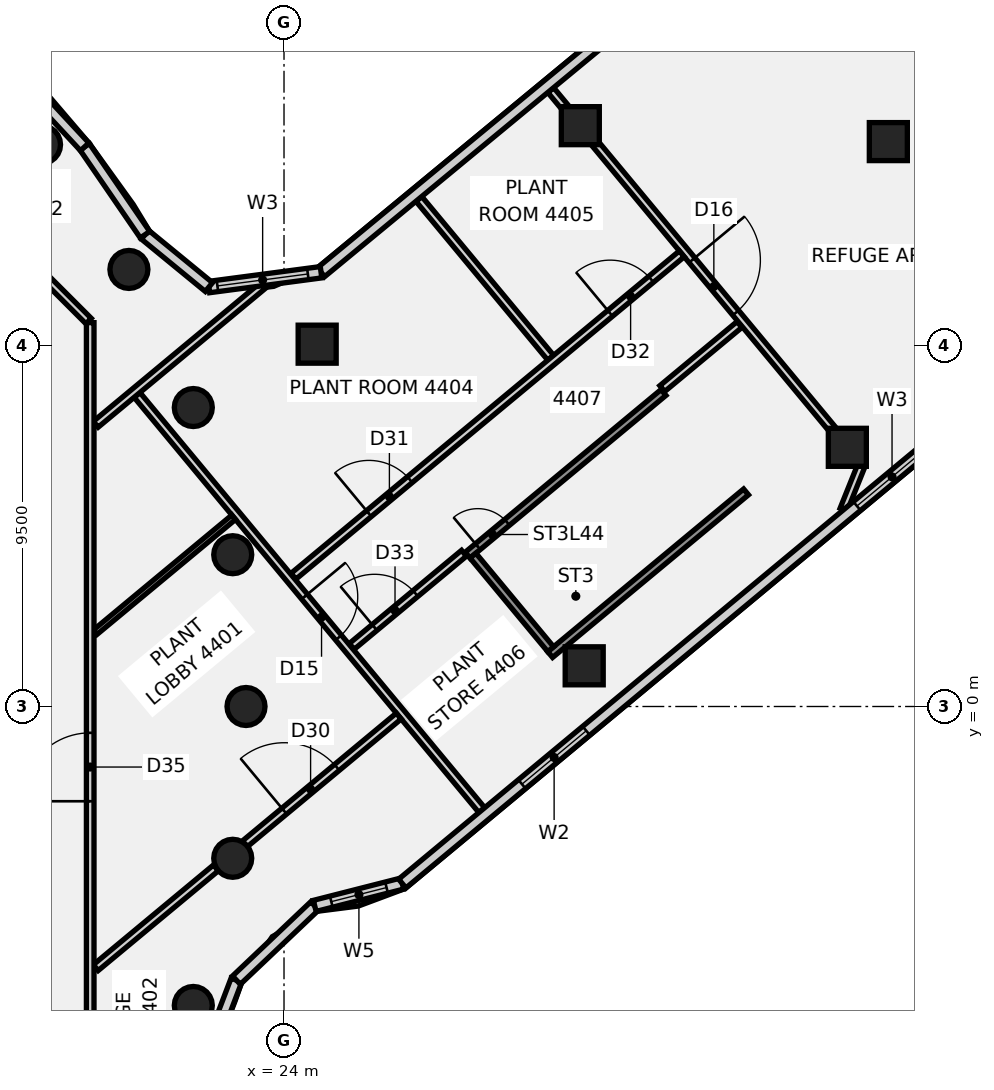
"""IFC4 building model, lengths in metres.
Left out: names, types, materials, properties, quantities, classifications, styles, units other than length and angle.
Written with IfcOpenShell. Run it as: python <this file> out.ifc"""

import sys

from ifc_helpers import new_model, si_unit, direction, frame, frame_2d, origin, origin_2d, place, context, subcontext, project, spatial, polyline, rectangle, circle, outline, extrude, element, fill, save


model = new_model("IFC4")
c1 = context("Model", 3, precision=1e-05, world=origin(), true_north=direction((0.0, 1.0)))
c2 = subcontext(c1, "Body", "Model", "MODEL_VIEW")
j1 = project(units=[si_unit("LENGTHUNIT", "METRE"), si_unit("PLANEANGLEUNIT", "RADIAN")], contexts=[c1])
p1 = place(None, origin())
s1 = spatial("IfcSite", under=j1, at=p1, CompositionType="ELEMENT")
p2 = place(p1, origin())
s2 = spatial("IfcBuilding", under=s1, at=p2, CompositionType="ELEMENT")
p3 = place(p2, frame((0.0, 0.0, 178.0)))
s3 = spatial("IfcBuildingStorey", under=s2, at=p3, CompositionType="ELEMENT", Elevation=178.0)
for number, where, z_axis, x_axis in (
    (1, (23.0, 0.0, -0.18), (0.0, 0.0, 1.0), (1.0, 0.0, 0.0)),
    (2, (22.651, 3.994, -0.18), (0.0, 0.0, 1.0), (1.0, 0.0, 0.0)),
    (3, (21.613, 7.866, -0.18), (0.0, 0.0, 1.0), (1.0, 0.0, 0.0)),
    (4, (19.919, 11.5, -0.18), (0.0, 0.0, 1.0), (1.0, 0.0, 0.0)),
    (5, (17.619, 14.784, -0.18), (0.0, 0.0, 1.0), (1.0, 0.0, 0.0)),
    (6, (21.613, -7.866, -0.18), (0.0, 0.0, 1.0), (1.0, 0.0, 0.0)),
    (7, (22.651, -3.994, -0.18), (0.0, 0.0, 1.0), (1.0, 0.0, 0.0)),
):
    element("IfcColumn", number, at=place(p3, frame(where, z_axis=z_axis, x_axis=x_axis)), inside=s3, PredefinedType="COLUMN", context=c2, shape_type="SweptSolid", body=[
        extrude(circle(Radius=0.5, at=origin_2d()), origin(), (0.0, 0.0, 1.0), 4.54),
    ])
for number, where, z_axis, x_axis in (
    (8, (31.797, 15.283, -0.151), (0.0, 0.0, 1.0), (0.769, 0.639, 0.0)),
    (9, (38.823, 6.82, -0.151), (0.0, 0.0, 1.0), (0.769, 0.639, 0.0)),
):
    element("IfcColumn", number, at=place(p3, frame(where, z_axis=z_axis, x_axis=x_axis)), inside=s3, PredefinedType="COLUMN", context=c2, shape_type="SweptSolid", body=[
        extrude(rectangle(XDim=1.0, YDim=1.0, at=origin_2d()), origin(), (0.0, 0.0, 1.0), 4.401),
    ])
for number, where, z_axis, x_axis in (
    (10, (24.872, 9.534, -0.162), (0.0, 0.0, 1.0), (0.769, 0.639, 0.0)),
    (11, (31.899, 1.071, -0.162), (0.0, 0.0, 1.0), (0.769, 0.639, 0.0)),
):
    element("IfcColumn", number, at=place(p3, frame(where, z_axis=z_axis, x_axis=x_axis)), inside=s3, PredefinedType="COLUMN", context=c2, shape_type="SweptSolid", body=[
        extrude(rectangle(XDim=1.0, YDim=1.0, at=origin_2d()), origin(), (0.0, 0.0, 1.0), 4.412),
    ])
p4 = place(p3, frame((39.902, 14.864, -0.132), z_axis=(0.0, 0.0, 1.0), x_axis=(0.769372797728, 0.638800045488, 0.0)))
e12 = element("IfcColumn", 12, at=p4, inside=s3, PredefinedType="COLUMN", context=c2, shape_type="SweptSolid", body=[
    extrude(rectangle(XDim=1.0, YDim=1.0, at=origin_2d()), origin(), (0.0, 0.0, 1.0), 4.382),
])
p5 = place(p3, frame((20.132, 8.198, 0.0), z_axis=(0.0, 0.0, 1.0), x_axis=(0.63886599142, -0.76931803892, 0.0)))
e13 = element("IfcWall", 13, at=p5, inside=s3, PredefinedType="PARTITIONING", context=c2, shape_type="SweptSolid", body=[
    extrude(rectangle(XDim=14.199, YDim=0.2, at=frame_2d((7.1, 0.0))), origin(), (0.0, 0.0, 1.0), 3.55),
])
p6 = place(p5, frame((6.9, 0.0, 0.0)))
e14 = element("IfcOpeningElement", 14, at=p6, cuts=e13, PredefinedType="OPENING", context=c2, shape_type="SweptSolid", body=[
    extrude(rectangle(XDim=1.4, YDim=2.1, at=frame_2d((0.7, 1.05))), frame((0.0, 0.11, 0.0), z_axis=(0.0, -1.0, 0.0), x_axis=(1.0, 0.0, 0.0)), (0.0, 0.0, 1.0), 0.22),
])
p7 = place(p3, frame((27.549, 13.355, 0.0), z_axis=(0.0, 0.0, 1.0), x_axis=(0.638732777431, -0.769428644538, 0.0)))
e15 = element("IfcWall", 15, at=p7, inside=s3, PredefinedType="PARTITIONING", context=c2, shape_type="SweptSolid", body=[
    extrude(rectangle(XDim=5.43, YDim=0.2, at=frame_2d((2.715, 0.0))), origin(), (0.0, 0.0, 1.0), 3.65),
])
p8 = place(p3, frame((31.019, 16.219, 0.0), z_axis=(0.0, 0.0, 1.0), x_axis=(0.638955780134, -0.769243466682, 0.0)))
e16 = element("IfcWall", 16, at=p8, inside=s3, PredefinedType="PARTITIONING", context=c2, shape_type="SweptSolid", body=[
    extrude(rectangle(XDim=0.626, YDim=0.2, at=frame_2d((0.313, 0.0))), origin(), (0.0, 0.0, 1.0), 3.66),
])
p9 = place(p3, frame((32.175, 14.827, 0.0), z_axis=(0.0, 0.0, 1.0), x_axis=(0.638855099659, -0.769327083651, 0.0)))
e17 = element("IfcWall", 17, at=p9, inside=s3, PredefinedType="PARTITIONING", context=c2, shape_type="SweptSolid", body=[
    extrude(rectangle(XDim=9.816, YDim=0.2, at=frame_2d((4.908, 0.0))), origin(), (0.0, 0.0, 1.0), 3.55),
])
p10 = place(p9, frame((4.009, 0.0, 0.0)))
e18 = element("IfcOpeningElement", 18, at=p10, cuts=e17, PredefinedType="OPENING", context=c2, shape_type="SweptSolid", body=[
    extrude(rectangle(XDim=1.8, YDim=2.1, at=frame_2d((0.9, 1.05))), frame((0.0, 0.11, 0.0), z_axis=(0.0, -1.0, 0.0), x_axis=(1.0, 0.0, 0.0)), (0.0, 0.0, 1.0), 0.22),
])
p11 = place(p3, frame((39.202, 6.365, 0.0), z_axis=(0.0, 0.0, 1.0), x_axis=(-0.372742207649, -0.92793493664, 0.0)))
e19 = element("IfcWall", 19, at=p11, inside=s3, PredefinedType="PARTITIONING", context=c2, shape_type="SweptSolid", body=[
    extrude(rectangle(XDim=1.277, YDim=0.2, at=frame_2d((0.638, 0.0))), origin(), (0.0, 0.0, 1.0), 3.66),
])
p12 = place(p3, frame((17.142, 11.858, 0.0), z_axis=(0.0, 0.0, 1.0), x_axis=(0.707106781187, -0.707106781187, 0.0)))
e20 = element("IfcWall", 20, at=p12, inside=s3, PredefinedType="PARTITIONING", context=c2, shape_type="SweptSolid", body=[
    extrude(rectangle(XDim=2.426, YDim=0.2, at=frame_2d((1.213, 0.0))), origin(), (0.0, 0.0, 1.0), 3.66),
])
p13 = place(p3, frame((19.046, -6.872, 0.0), z_axis=(0.0, 0.0, 1.0), x_axis=(0.7693983164, 0.63876930947, 0.0)))
e21 = element("IfcWall", 21, at=p13, inside=s3, PredefinedType="PARTITIONING", context=c2, shape_type="SweptSolid", body=[
    extrude(rectangle(XDim=4.11, YDim=0.2, at=frame_2d((2.055, 0.0))), origin(), (0.0, 0.0, 1.0), 3.66),
])
p14 = place(p3, frame((22.969, -3.615, 0.0), z_axis=(0.0, 0.0, 1.0), x_axis=(0.769379352308, 0.638792151049, 0.0)))
e22 = element("IfcWall", 22, at=p14, inside=s3, PredefinedType="PARTITIONING", context=c2, shape_type="SweptSolid", body=[
    extrude(rectangle(XDim=5.265, YDim=0.2, at=frame_2d((2.632, 0.0))), origin(), (0.0, 0.0, 1.0), 3.66),
])
p15 = place(p14, frame((1.35, 0.0, 0.0)))
e23 = element("IfcOpeningElement", 23, at=p15, cuts=e22, PredefinedType="OPENING", context=c2, shape_type="SweptSolid", body=[
    extrude(rectangle(XDim=1.8, YDim=2.1, at=frame_2d((0.9, 1.05))), frame((0.0, 0.11, 0.0), z_axis=(0.0, -1.0, 0.0), x_axis=(1.0, 0.0, 0.0)), (0.0, 0.0, 1.0), 0.22),
])
p16 = place(p3, frame((19.031, 1.954, 0.0), z_axis=(0.0, 0.0, 1.0), x_axis=(0.769415619975, 0.63874846672, 0.0)))
e24 = element("IfcWall", 24, at=p16, inside=s3, PredefinedType="PARTITIONING", context=c2, shape_type="SweptSolid", body=[
    extrude(rectangle(XDim=4.736, YDim=0.15, at=frame_2d((2.368, 0.0))), origin(), (0.0, 0.0, 1.0), 3.55),
])
p17 = place(p3, frame((19.046, 7.426, 0.0), z_axis=(0.0, 0.0, 1.0), x_axis=(0.769405124165, 0.63876110942, 0.0)))
e25 = element("IfcWall", 25, at=p17, inside=s3, PredefinedType="PARTITIONING", context=c2, shape_type="SweptSolid", body=[
    extrude(rectangle(XDim=5.707, YDim=0.2, at=frame_2d((2.854, 0.0))), origin(), (0.0, 0.0, 1.0), 3.66),
])
p18 = place(p3, frame((24.249, 3.427, 0.0), z_axis=(0.0, 0.0, 1.0), x_axis=(0.769410395732, 0.638754759622, 0.0)))
e26 = element("IfcWall", 26, at=p18, inside=s3, PredefinedType="PARTITIONING", context=c2, shape_type="SweptSolid", body=[
    extrude(rectangle(XDim=13.28, YDim=0.2, at=frame_2d((6.64, 0.0))), origin(), (0.0, 0.0, 1.0), 3.55),
])
p19 = place(p18, frame((2.58, 0.0, 0.0)))
e27 = element("IfcOpeningElement", 27, at=p19, cuts=e26, PredefinedType="OPENING", context=c2, shape_type="SweptSolid", body=[
    extrude(rectangle(XDim=1.4, YDim=2.1, at=frame_2d((0.7, 1.05))), frame((0.0, 0.11, 0.0), z_axis=(0.0, -1.0, 0.0), x_axis=(1.0, 0.0, 0.0)), (0.0, 0.0, 1.0), 0.22),
])
p20 = place(p18, frame((10.83, 0.0, 0.0)))
e28 = element("IfcOpeningElement", 28, at=p20, cuts=e26, PredefinedType="OPENING", context=c2, shape_type="SweptSolid", body=[
    extrude(rectangle(XDim=1.4, YDim=2.1, at=frame_2d((0.7, 1.05))), frame((0.0, 0.11, 0.0), z_axis=(0.0, -1.0, 0.0), x_axis=(1.0, 0.0, 0.0)), (0.0, 0.0, 1.0), 0.22),
])
p21 = place(p3, frame((25.782, 1.581, 0.0), z_axis=(0.0, 0.0, 1.0), x_axis=(0.769418728977, 0.6387447217, 0.0)))
e29 = element("IfcWall", 29, at=p21, inside=s3, PredefinedType="PARTITIONING", context=c2, shape_type="SweptSolid", body=[
    extrude(rectangle(XDim=3.839, YDim=0.2, at=frame_2d((1.92, 0.0))), origin(), (0.0, 0.0, 1.0), 3.55),
])
p22 = place(p21, frame((0.78, 0.0, 0.0)))
e30 = element("IfcOpeningElement", 30, at=p22, cuts=e29, PredefinedType="OPENING", context=c2, shape_type="SweptSolid", body=[
    extrude(rectangle(XDim=1.4, YDim=2.1, at=frame_2d((0.7, 1.05))), frame((0.0, 0.11, 0.0), z_axis=(0.0, -1.0, 0.0), x_axis=(1.0, 0.0, 0.0)), (0.0, 0.0, 1.0), 0.22),
])
p23 = place(p3, frame((33.953, 8.365, 0.0), z_axis=(0.0, 0.0, 1.0), x_axis=(0.76940988431, 0.638755375653, 0.0)))
e31 = element("IfcWall", 31, at=p23, inside=s3, PredefinedType="PARTITIONING", context=c2, shape_type="SweptSolid", body=[
    extrude(rectangle(XDim=2.64, YDim=0.2, at=frame_2d((1.32, 0.0))), origin(), (0.0, 0.0, 1.0), 3.55),
])
p24 = place(p3, frame((18.9, -10.1, 0.0), z_axis=(0.0, 0.0, 1.0), x_axis=(0.0, 1.0, 0.0)))
e32 = element("IfcWall", 32, at=p24, inside=s3, PredefinedType="PARTITIONING", context=c2, shape_type="SweptSolid", body=[
    extrude(rectangle(XDim=20.2, YDim=0.2, at=frame_2d((10.1, 0.0))), origin(), (0.0, 0.0, 1.0), 3.66),
])
p25 = place(p24, frame((7.607, 0.0, 0.0)))
e33 = element("IfcOpeningElement", 33, at=p25, cuts=e32, PredefinedType="OPENING", context=c2, shape_type="SweptSolid", body=[
    extrude(rectangle(XDim=1.8, YDim=2.1, at=frame_2d((0.9, 1.05))), frame((0.0, 0.11, 0.0), z_axis=(0.0, -1.0, 0.0), x_axis=(1.0, 0.0, 0.0)), (0.0, 0.0, 1.0), 0.22),
])
p26 = place(p3, frame((21.878, -9.485, 0.0), z_axis=(0.0, 0.0, 1.0), x_axis=(0.355729376875, 0.934589006156, 0.0)))
e34 = element("IfcWall", 34, at=p26, inside=s3, PredefinedType="SOLIDWALL", context=c2, shape_type="SweptSolid", body=[
    extrude(rectangle(XDim=2.443, YDim=0.3, at=frame_2d((1.222, 0.0))), origin(), (0.0, 0.0, 1.0), 4.36),
])
p27 = place(p3, frame((22.748, -7.201, 0.0), z_axis=(0.0, 0.0, 1.0), x_axis=(0.725512114768, 0.68820939497, 0.0)))
e35 = element("IfcWall", 35, at=p27, inside=s3, PredefinedType="SOLIDWALL", context=c2, shape_type="SweptSolid", body=[
    extrude(rectangle(XDim=2.841, YDim=0.3, at=frame_2d((1.42, 0.0))), origin(), (0.0, 0.0, 1.0), 4.36),
])
p28 = place(p3, frame((24.808, -5.246, 0.0), z_axis=(0.0, 0.0, 1.0), x_axis=(0.968959583325, 0.247219185913, 0.0)))
e36 = element("IfcWall", 36, at=p28, inside=s3, PredefinedType="SOLIDWALL", context=c2, shape_type="SweptSolid", body=[
    extrude(rectangle(XDim=2.378, YDim=0.3, at=frame_2d((1.189, 0.0))), origin(), (0.0, 0.0, 1.0), 4.36),
])
p29 = place(p28, frame((0.45, 0.0, 1.4)))
e37 = element("IfcOpeningElement", 37, at=p29, cuts=e36, PredefinedType="OPENING", context=c2, shape_type="SweptSolid", body=[
    extrude(rectangle(XDim=1.5, YDim=1.0, at=frame_2d((0.75, 0.5))), frame((0.0, 0.16, 0.0), z_axis=(0.0, -1.0, 0.0), x_axis=(1.0, 0.0, 0.0)), (0.0, 0.0, 1.0), 0.32),
])
p30 = place(p3, frame((27.113, -4.658, 0.0), z_axis=(0.0, 0.0, 1.0), x_axis=(0.769372572794, 0.6388003164, 0.0)))
e38 = element("IfcWall", 38, at=p30, inside=s3, PredefinedType="SOLIDWALL", context=c2, shape_type="SweptSolid", body=[
    extrude(rectangle(XDim=22.693, YDim=0.3, at=frame_2d((11.347, 0.0))), origin(), (0.0, 0.0, 1.0), 4.36),
])
p31 = place(p30, frame((4.093, 0.0, 1.4)))
e39 = element("IfcOpeningElement", 39, at=p31, cuts=e38, PredefinedType="OPENING", context=c2, shape_type="SweptSolid", body=[
    extrude(rectangle(XDim=2.199, YDim=2.6, at=frame_2d((1.1, 1.3))), frame((0.0, 0.16, 0.0), z_axis=(0.0, -1.0, 0.0), x_axis=(1.0, 0.0, 0.0)), (0.0, 0.0, 1.0), 0.32),
])
p32 = place(p30, frame((15.55, 0.0, 1.4)))
e40 = element("IfcOpeningElement", 40, at=p32, cuts=e38, PredefinedType="OPENING", context=c2, shape_type="SweptSolid", body=[
    extrude(rectangle(XDim=2.4, YDim=2.1, at=frame_2d((1.2, 1.05))), frame((0.0, 0.16, 0.0), z_axis=(0.0, -1.0, 0.0), x_axis=(1.0, 0.0, 0.0)), (0.0, 0.0, 1.0), 0.32),
])
p33 = place(p3, frame((44.816, 12.471, 0.0), z_axis=(0.0, 0.0, 1.0), x_axis=(-0.638801916699, 0.769371244083, 0.0)))
e41 = element("IfcWall", 41, at=p33, inside=s3, PredefinedType="SOLIDWALL", context=c2, shape_type="SweptSolid", body=[
    extrude(rectangle(XDim=9.96, YDim=0.3, at=frame_2d((4.98, 0.0))), origin(), (0.0, 0.0, 1.0), 4.36),
])
p34 = place(p33, frame((1.98, 0.0, 1.4)))
e42 = element("IfcOpeningElement", 42, at=p34, cuts=e41, PredefinedType="OPENING", context=c2, shape_type="SweptSolid", body=[
    extrude(rectangle(XDim=6.0, YDim=2.6, at=frame_2d((3.0, 1.3))), frame((0.0, 0.16, 0.0), z_axis=(0.0, -1.0, 0.0), x_axis=(1.0, 0.0, 0.0)), (0.0, 0.0, 1.0), 0.32),
])
p35 = place(p3, frame((35.821, 20.378, 0.0), z_axis=(0.0, 0.0, 1.0), x_axis=(-0.771230735656, -0.63655569464, 0.0)))
e43 = element("IfcWall", 43, at=p35, inside=s3, PredefinedType="SOLIDWALL", context=c2, shape_type="SweptSolid", body=[
    extrude(rectangle(XDim=14.064, YDim=0.3, at=frame_2d((7.032, 0.0))), origin(), (0.0, 0.0, 1.0), 4.36),
])
p36 = place(p3, frame((24.974, 11.426, 0.0), z_axis=(0.0, 0.0, 1.0), x_axis=(-0.991381265138, -0.131008347573, 0.0)))
e44 = element("IfcWall", 44, at=p36, inside=s3, PredefinedType="SOLIDWALL", context=c2, shape_type="SweptSolid", body=[
    extrude(rectangle(XDim=2.976, YDim=0.3, at=frame_2d((1.488, 0.0))), origin(), (0.0, 0.0, 1.0), 4.36),
])
p37 = place(p36, frame((0.35, 0.0, 1.4)))
e45 = element("IfcOpeningElement", 45, at=p37, cuts=e44, PredefinedType="OPENING", context=c2, shape_type="SweptSolid", body=[
    extrude(rectangle(XDim=2.4, YDim=2.1, at=frame_2d((1.2, 1.05))), frame((0.0, 0.16, 0.0), z_axis=(0.0, -1.0, 0.0), x_axis=(1.0, 0.0, 0.0)), (0.0, 0.0, 1.0), 0.32),
])
p38 = place(p3, frame((22.024, 11.036, 0.0), z_axis=(0.0, 0.0, 1.0), x_axis=(-0.773396617802, 0.633922449178, 0.0)))
e46 = element("IfcWall", 46, at=p38, inside=s3, PredefinedType="SOLIDWALL", context=c2, shape_type="SweptSolid", body=[
    extrude(rectangle(XDim=2.174, YDim=0.3, at=frame_2d((1.087, 0.0))), origin(), (0.0, 0.0, 1.0), 4.36),
])
p39 = place(p3, frame((20.342, 12.414, 0.0), z_axis=(0.0, 0.0, 1.0), x_axis=(-0.56597472468, 0.824422592499, 0.0)))
e47 = element("IfcWall", 47, at=p39, inside=s3, PredefinedType="SOLIDWALL", context=c2, shape_type="SweptSolid", body=[
    extrude(rectangle(XDim=2.806, YDim=0.3, at=frame_2d((1.403, 0.0))), origin(), (0.0, 0.0, 1.0), 4.36),
])
p40 = place(p3, frame((18.754, 14.727, 0.0), z_axis=(0.0, 0.0, 1.0), x_axis=(-0.680429698926, 0.732813362883, 0.0)))
e48 = element("IfcWall", 48, at=p40, inside=s3, PredefinedType="SOLIDWALL", context=c2, shape_type="SweptSolid", body=[
    extrude(rectangle(XDim=3.938, YDim=0.3, at=frame_2d((1.969, 0.0))), origin(), (0.0, 0.0, 1.0), 4.36),
])
p41 = place(p3, frame((28.832, 3.982, -0.18), z_axis=(0.0, 0.0, 1.0), x_axis=(0.769366970134, 0.638807064196, 0.0)))
e49 = element("IfcWall", 49, at=p41, inside=s3, PredefinedType="SHEAR", context=c2, shape_type="SweptSolid", body=[
    extrude(rectangle(XDim=6.7, YDim=0.2, at=frame_2d((3.35, 0.0))), origin(), (0.0, 0.0, 1.0), 3.73),
])
p42 = place(p41, frame((0.35, 0.0, 0.0)))
e50 = element("IfcOpeningElement", 50, at=p42, cuts=e49, PredefinedType="OPENING", context=c2, shape_type="SweptSolid", body=[
    extrude(rectangle(XDim=1.0, YDim=2.1, at=frame_2d((0.5, 1.05))), frame((0.0, 0.11, 0.0), z_axis=(0.0, -1.0, 0.0), x_axis=(1.0, 0.0, 0.0)), (0.0, 0.0, 1.0), 0.22),
])
p43 = place(p3, frame((31.003, 1.367, -0.18), z_axis=(0.0, 0.0, 1.0), x_axis=(0.76938487904, 0.638785494438, 0.0)))
e51 = element("IfcWall", 51, at=p43, inside=s3, PredefinedType="SHEAR", context=c2, shape_type="SweptSolid", body=[
    extrude(rectangle(XDim=6.7, YDim=0.2, at=frame_2d((3.35, 0.0))), origin(), (0.0, 0.0, 1.0), 3.73),
])
p44 = place(p3, frame((31.017, 1.507, -0.18), z_axis=(0.0, 0.0, 1.0), x_axis=(-0.638780087326, 0.769389368289, 0.0)))
e52 = element("IfcWall", 52, at=p44, inside=s3, PredefinedType="SHEAR", context=c2, shape_type="SweptSolid", body=[
    extrude(rectangle(XDim=3.2, YDim=0.2, at=frame_2d((1.6, 0.0))), origin(), (0.0, 0.0, 1.0), 3.73),
])
p45 = place(p3, frame((0.0, 0.0, -0.18)))
e53 = element("IfcWall", 53, at=p45, inside=s3, PredefinedType="SHEAR", context=c2, shape_type="SweptSolid", body=[
    extrude(outline(polyline([(35.94, 5.596), (36.094, 5.723), (34.05, 8.186), (33.896, 8.058), (35.94, 5.596)])), origin(), (0.0, 0.0, 1.0), 3.73),
])
p46 = place(p6, frame((1.4, 0.0, 0.0), z_axis=(0.0, 0.0, 1.0), x_axis=(-1.0, 0.0, 0.0)))
e54 = element("IfcDoor", 54, at=p46, inside=s3, OperationType="DOUBLE_DOOR_SINGLE_SWING", PredefinedType="DOOR", context=c2, shape_type="SweptSolid", body=[
    extrude(rectangle(XDim=1.4, YDim=2.1, at=frame_2d((0.7, 1.05))), frame((0.0, 0.025, 0.0), z_axis=(0.0, -1.0, 0.0), x_axis=(1.0, 0.0, 0.0)), (0.0, 0.0, 1.0), 0.05),
])
fill(e14, e54)
p47 = place(p10, origin())
e55 = element("IfcDoor", 55, at=p47, inside=s3, OperationType="DOUBLE_DOOR_SINGLE_SWING", PredefinedType="DOOR", context=c2, shape_type="SweptSolid", body=[
    extrude(rectangle(XDim=1.8, YDim=2.1, at=frame_2d((0.9, 1.05))), frame((0.0, 0.025, 0.0), z_axis=(0.0, -1.0, 0.0), x_axis=(1.0, 0.0, 0.0)), (0.0, 0.0, 1.0), 0.05),
])
fill(e18, e55)
p48 = place(p15, frame((1.8, 0.0, 0.0), z_axis=(0.0, 0.0, 1.0), x_axis=(-1.0, 0.0, 0.0)))
e56 = element("IfcDoor", 56, at=p48, inside=s3, OperationType="DOUBLE_DOOR_SINGLE_SWING", PredefinedType="DOOR", context=c2, shape_type="SweptSolid", body=[
    extrude(rectangle(XDim=1.8, YDim=2.1, at=frame_2d((0.9, 1.05))), frame((0.0, 0.025, 0.0), z_axis=(0.0, -1.0, 0.0), x_axis=(1.0, 0.0, 0.0)), (0.0, 0.0, 1.0), 0.05),
])
fill(e23, e56)
p49 = place(p19, origin())
e57 = element("IfcDoor", 57, at=p49, inside=s3, OperationType="DOUBLE_DOOR_SINGLE_SWING", PredefinedType="DOOR", context=c2, shape_type="SweptSolid", body=[
    extrude(rectangle(XDim=1.4, YDim=2.1, at=frame_2d((0.7, 1.05))), frame((0.0, 0.025, 0.0), z_axis=(0.0, -1.0, 0.0), x_axis=(1.0, 0.0, 0.0)), (0.0, 0.0, 1.0), 0.05),
])
fill(e27, e57)
p50 = place(p20, origin())
e58 = element("IfcDoor", 58, at=p50, inside=s3, OperationType="DOUBLE_DOOR_SINGLE_SWING", PredefinedType="DOOR", context=c2, shape_type="SweptSolid", body=[
    extrude(rectangle(XDim=1.4, YDim=2.1, at=frame_2d((0.7, 1.05))), frame((0.0, 0.025, 0.0), z_axis=(0.0, -1.0, 0.0), x_axis=(1.0, 0.0, 0.0)), (0.0, 0.0, 1.0), 0.05),
])
fill(e28, e58)
p51 = place(p22, frame((1.4, 0.0, 0.0), z_axis=(0.0, 0.0, 1.0), x_axis=(-1.0, 0.0, 0.0)))
e59 = element("IfcDoor", 59, at=p51, inside=s3, OperationType="DOUBLE_DOOR_SINGLE_SWING", PredefinedType="DOOR", context=c2, shape_type="SweptSolid", body=[
    extrude(rectangle(XDim=1.4, YDim=2.1, at=frame_2d((0.7, 1.05))), frame((0.0, 0.025, 0.0), z_axis=(0.0, -1.0, 0.0), x_axis=(1.0, 0.0, 0.0)), (0.0, 0.0, 1.0), 0.05),
])
fill(e30, e59)
p52 = place(p25, origin())
e60 = element("IfcDoor", 60, at=p52, inside=s3, OperationType="DOUBLE_DOOR_SINGLE_SWING", PredefinedType="DOOR", context=c2, shape_type="SweptSolid", body=[
    extrude(rectangle(XDim=1.8, YDim=2.1, at=frame_2d((0.9, 1.05))), frame((0.0, 0.025, 0.0), z_axis=(0.0, -1.0, 0.0), x_axis=(1.0, 0.0, 0.0)), (0.0, 0.0, 1.0), 0.05),
])
fill(e33, e60)
p53 = place(p29, origin())
e61 = element("IfcWindow", 61, at=p53, inside=s3, PartitioningType="SINGLE_PANEL", PredefinedType="WINDOW", context=c2, shape_type="SweptSolid", body=[
    extrude(rectangle(XDim=1.5, YDim=1.0, at=frame_2d((0.75, 0.5))), frame((0.0, 0.03, 0.0), z_axis=(0.0, -1.0, 0.0), x_axis=(1.0, 0.0, 0.0)), (0.0, 0.0, 1.0), 0.06),
])
fill(e37, e61)
p54 = place(p31, origin())
e62 = element("IfcWindow", 62, at=p54, inside=s3, PartitioningType="SINGLE_PANEL", PredefinedType="WINDOW", context=c2, shape_type="SweptSolid", body=[
    extrude(rectangle(XDim=2.199, YDim=2.6, at=frame_2d((1.1, 1.3))), frame((0.0, 0.03, 0.0), z_axis=(0.0, -1.0, 0.0), x_axis=(1.0, 0.0, 0.0)), (0.0, 0.0, 1.0), 0.06),
])
fill(e39, e62)
p55 = place(p32, origin())
e63 = element("IfcWindow", 63, at=p55, inside=s3, PartitioningType="SINGLE_PANEL", PredefinedType="WINDOW", context=c2, shape_type="SweptSolid", body=[
    extrude(rectangle(XDim=2.4, YDim=2.1, at=frame_2d((1.2, 1.05))), frame((0.0, 0.03, 0.0), z_axis=(0.0, -1.0, 0.0), x_axis=(1.0, 0.0, 0.0)), (0.0, 0.0, 1.0), 0.06),
])
fill(e40, e63)
p56 = place(p34, origin())
e64 = element("IfcWindow", 64, at=p56, inside=s3, PartitioningType="SINGLE_PANEL", PredefinedType="WINDOW", context=c2, shape_type="SweptSolid", body=[
    extrude(rectangle(XDim=6.0, YDim=2.6, at=frame_2d((3.0, 1.3))), frame((0.0, 0.03, 0.0), z_axis=(0.0, -1.0, 0.0), x_axis=(1.0, 0.0, 0.0)), (0.0, 0.0, 1.0), 0.06),
])
fill(e42, e64)
p57 = place(p37, origin())
e65 = element("IfcWindow", 65, at=p57, inside=s3, PartitioningType="SINGLE_PANEL", PredefinedType="WINDOW", context=c2, shape_type="SweptSolid", body=[
    extrude(rectangle(XDim=2.4, YDim=2.1, at=frame_2d((1.2, 1.05))), frame((0.0, 0.03, 0.0), z_axis=(0.0, -1.0, 0.0), x_axis=(1.0, 0.0, 0.0)), (0.0, 0.0, 1.0), 0.06),
])
fill(e45, e65)
p58 = place(p42, origin())
e66 = element("IfcDoor", 66, at=p58, inside=s3, OperationType="SINGLE_SWING_LEFT", PredefinedType="DOOR", context=c2, shape_type="SweptSolid", body=[
    extrude(rectangle(XDim=1.0, YDim=2.1, at=frame_2d((0.5, 1.05))), frame((0.0, 0.025, 0.0), z_axis=(0.0, -1.0, 0.0), x_axis=(1.0, 0.0, 0.0)), (0.0, 0.0, 1.0), 0.05),
])
fill(e50, e66)
save(model, sys.argv[1])
